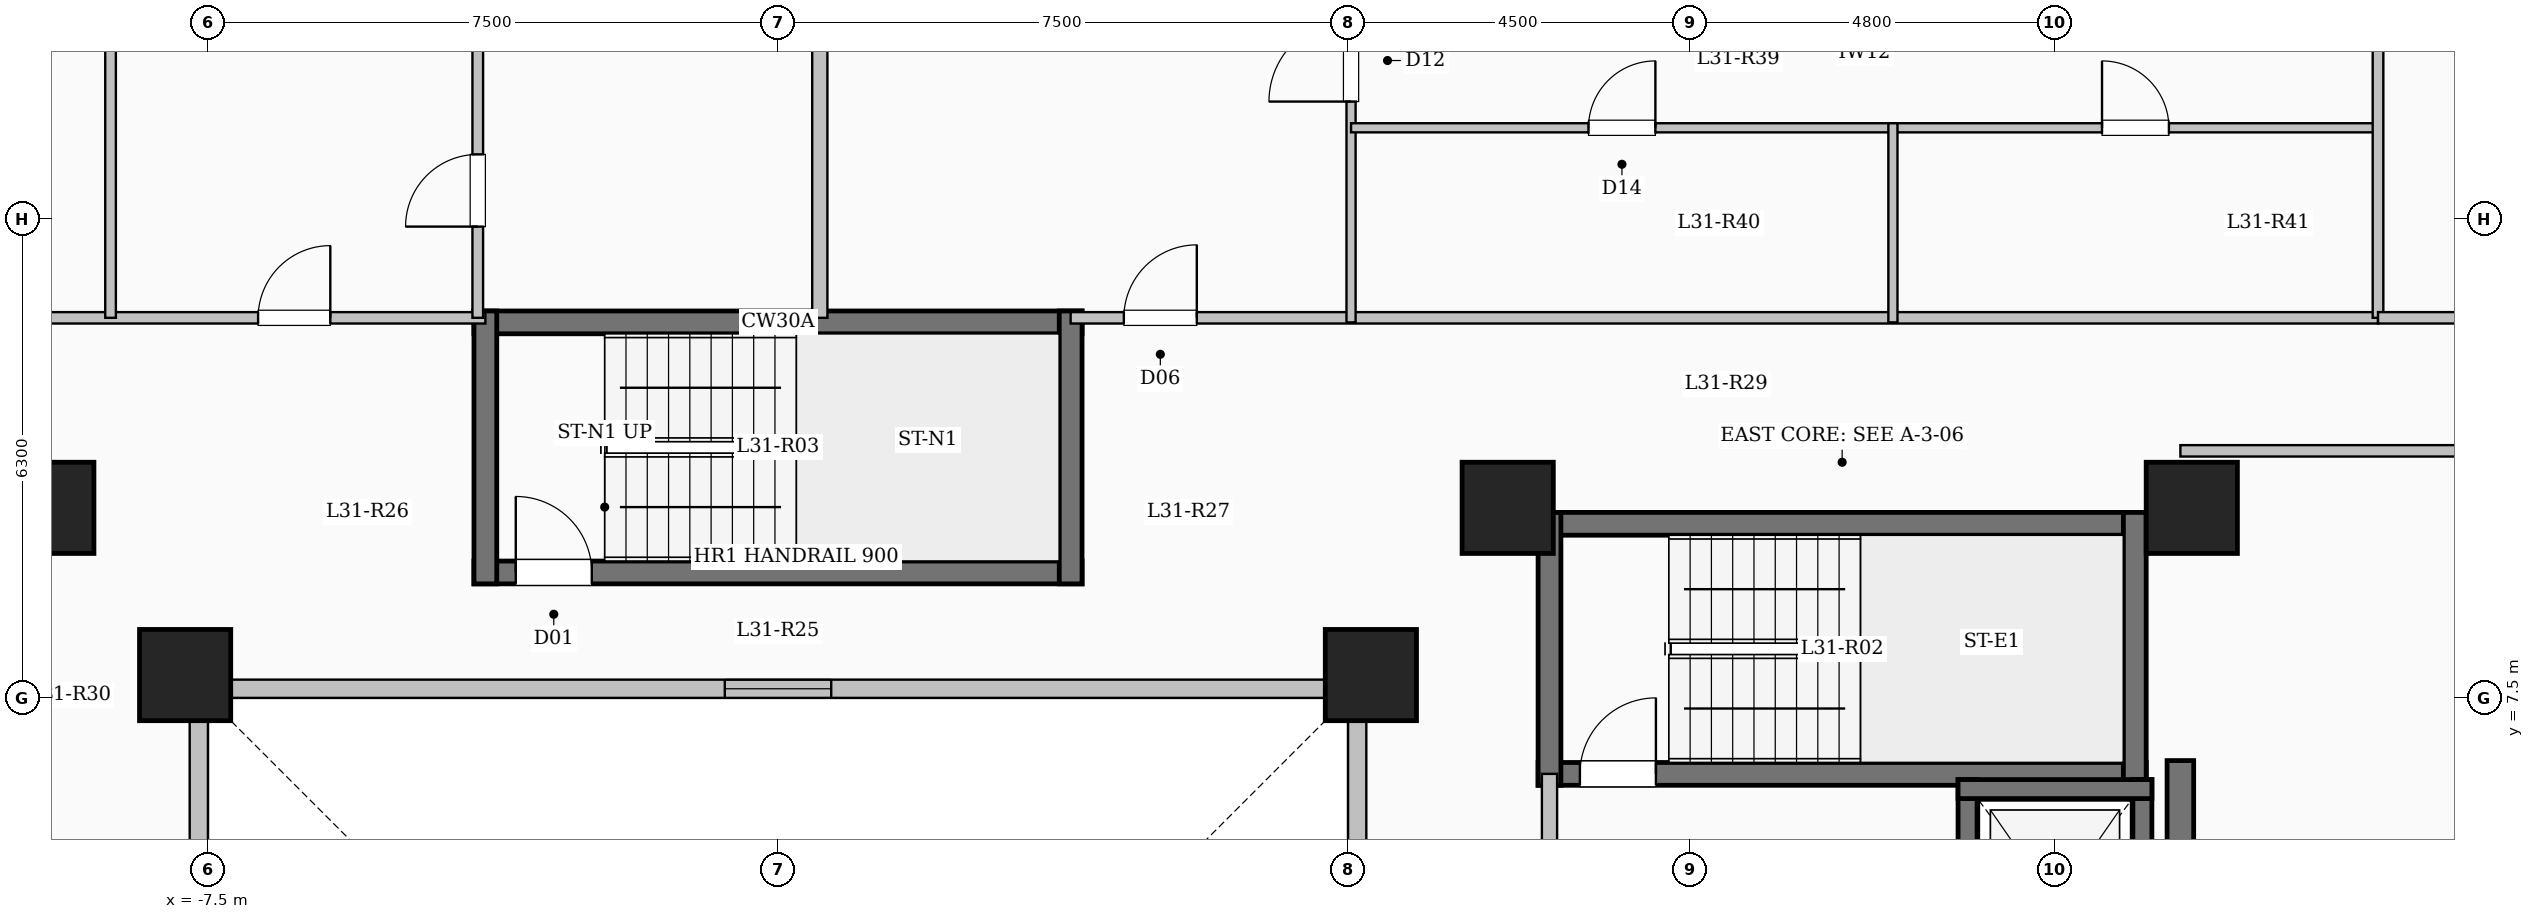
"""IFC4 building model, lengths in metres.
Left out: names, types, materials, properties, quantities, classifications, styles, units other than length and angle.
Written with IfcOpenShell. Run it as: python <this file> out.ifc"""

import sys

from ifc_helpers import new_model, si_unit, direction, frame, frame_2d, origin, origin_2d, place, context, subcontext, project, spatial, rectangle, extrude, element, fill, save


model = new_model("IFC4")
c1 = context("Model", 3, precision=1e-05, world=origin(), true_north=direction((0.0, 1.0)))
c2 = subcontext(c1, "Body", "Model", "MODEL_VIEW")
j1 = project(units=[si_unit("LENGTHUNIT", "METRE"), si_unit("PLANEANGLEUNIT", "RADIAN")], contexts=[c1])
p1 = place(None, origin())
s1 = spatial("IfcSite", under=j1, at=p1, CompositionType="ELEMENT")
p2 = place(p1, origin())
s2 = spatial("IfcBuilding", under=s1, at=p2, CompositionType="ELEMENT")
p3 = place(p2, frame((0.0, 0.0, 115.15)))
s3 = spatial("IfcBuildingStorey", under=s2, at=p3, CompositionType="ELEMENT", Elevation=115.15)
for number, where, z_axis, x_axis in (
    (1, (-7.8, 7.8, 0.0), (0.0, 0.0, 1.0), (1.0, 0.0, 0.0)),
    (2, (7.8, 7.8, 0.0), (0.0, 0.0, 1.0), (1.0, 0.0, 0.0)),
    (3, (-9.6, 10.0, 0.0), (0.0, 0.0, 1.0), (1.0, 0.0, 0.0)),
    (4, (9.6, 10.0, 0.0), (0.0, 0.0, 1.0), (1.0, 0.0, 0.0)),
    (5, (18.6, 10.0, 0.0), (0.0, 0.0, 1.0), (1.0, 0.0, 0.0)),
):
    element("IfcColumn", number, at=place(p3, frame(where, z_axis=z_axis, x_axis=x_axis)), inside=s3, PredefinedType="COLUMN", context=c2, shape_type="SweptSolid", body=[
        extrude(rectangle(XDim=1.2, YDim=1.2, at=origin_2d()), origin(), (0.0, 0.0, 1.0), 3.35),
    ])
p4 = place(p3, frame((7.62, -7.62, 0.0), z_axis=(0.0, 0.0, 1.0), x_axis=(0.0, 1.0, 0.0)))
e6 = element("IfcWall", 6, at=p4, inside=s3, PredefinedType="SOLIDWALL", context=c2, shape_type="SweptSolid", body=[
    extrude(rectangle(XDim=15.24, YDim=0.24, at=frame_2d((7.62, 0.0))), origin(), (0.0, 0.0, 1.0), 3.05),
])
p5 = place(p4, frame((6.92, 0.0, 0.95)))
e7 = element("IfcOpeningElement", 7, at=p5, cuts=e6, PredefinedType="OPENING", context=c2, shape_type="SweptSolid", body=[
    extrude(rectangle(XDim=1.4, YDim=1.5, at=frame_2d((0.7, 0.75))), frame((0.0, 0.13, 0.0), z_axis=(0.0, -1.0, 0.0), x_axis=(1.0, 0.0, 0.0)), (0.0, 0.0, 1.0), 0.26),
])
p6 = place(p3, frame((7.62, 7.62, 0.0), z_axis=(0.0, 0.0, 1.0), x_axis=(-1.0, 0.0, 0.0)))
e8 = element("IfcWall", 8, at=p6, inside=s3, PredefinedType="SOLIDWALL", context=c2, shape_type="SweptSolid", body=[
    extrude(rectangle(XDim=15.24, YDim=0.24, at=frame_2d((7.62, 0.0))), origin(), (0.0, 0.0, 1.0), 3.05),
])
p7 = place(p6, frame((6.92, 0.0, 0.95)))
e9 = element("IfcOpeningElement", 9, at=p7, cuts=e8, PredefinedType="OPENING", context=c2, shape_type="SweptSolid", body=[
    extrude(rectangle(XDim=1.4, YDim=1.5, at=frame_2d((0.7, 0.75))), frame((0.0, 0.13, 0.0), z_axis=(0.0, -1.0, 0.0), x_axis=(1.0, 0.0, 0.0)), (0.0, 0.0, 1.0), 0.26),
])
p8 = place(p3, frame((-7.62, 7.62, 0.0), z_axis=(0.0, 0.0, 1.0), x_axis=(0.0, -1.0, 0.0)))
e10 = element("IfcWall", 10, at=p8, inside=s3, PredefinedType="SOLIDWALL", context=c2, shape_type="SweptSolid", body=[
    extrude(rectangle(XDim=15.24, YDim=0.24, at=frame_2d((7.62, 0.0))), origin(), (0.0, 0.0, 1.0), 3.05),
])
p9 = place(p8, frame((6.92, 0.0, 0.95)))
e11 = element("IfcOpeningElement", 11, at=p9, cuts=e10, PredefinedType="OPENING", context=c2, shape_type="SweptSolid", body=[
    extrude(rectangle(XDim=1.4, YDim=1.5, at=frame_2d((0.7, 0.75))), frame((0.0, 0.13, 0.0), z_axis=(0.0, -1.0, 0.0), x_axis=(1.0, 0.0, 0.0)), (0.0, 0.0, 1.0), 0.26),
])
p10 = place(p3, frame((10.0, 9.79, 0.0), z_axis=(0.0, 0.0, 1.0), x_axis=(1.0, 0.0, 0.0)))
e12 = element("IfcWall", 12, at=p10, inside=s3, PredefinedType="SHEAR", context=c2, shape_type="SweptSolid", body=[
    extrude(rectangle(XDim=8.0, YDim=0.3, at=frame_2d((4.0, 0.0))), origin(), (0.0, 0.0, 1.0), 3.35),
])
p11 = place(p3, frame((10.0, 6.5, 0.0), z_axis=(0.0, 0.0, 1.0), x_axis=(1.0, 0.0, 0.0)))
e13 = element("IfcWall", 13, at=p11, inside=s3, PredefinedType="SHEAR", context=c2, shape_type="SweptSolid", body=[
    extrude(rectangle(XDim=8.0, YDim=0.3, at=frame_2d((4.0, 0.0))), origin(), (0.0, 0.0, 1.0), 3.35),
])
p12 = place(p11, frame((0.55, 0.0, 0.0)))
e14 = element("IfcOpeningElement", 14, at=p12, cuts=e13, PredefinedType="OPENING", context=c2, shape_type="SweptSolid", body=[
    extrude(rectangle(XDim=1.0, YDim=2.15, at=frame_2d((0.5, 1.075))), frame((0.0, 0.16, 0.0), z_axis=(0.0, -1.0, 0.0), x_axis=(1.0, 0.0, 0.0)), (0.0, 0.0, 1.0), 0.32),
])
for number, where, z_axis, x_axis in (
    (15, (10.15, 6.35, 0.0), (0.0, 0.0, 1.0), (0.0, 1.0, 0.0)),
    (16, (17.85, 6.35, 0.0), (0.0, 0.0, 1.0), (0.0, 1.0, 0.0)),
):
    element("IfcWall", number, at=place(p3, frame(where, z_axis=z_axis, x_axis=x_axis)), inside=s3, PredefinedType="SHEAR", context=c2, shape_type="SweptSolid", body=[
        extrude(rectangle(XDim=3.59, YDim=0.3, at=frame_2d((1.795, 0.0))), origin(), (0.0, 0.0, 1.0), 3.35),
    ])
p13 = place(p3, frame((-4.0, 12.44, 0.0), z_axis=(0.0, 0.0, 1.0), x_axis=(1.0, 0.0, 0.0)))
e17 = element("IfcWall", 17, at=p13, inside=s3, PredefinedType="SHEAR", context=c2, shape_type="SweptSolid", body=[
    extrude(rectangle(XDim=8.0, YDim=0.3, at=frame_2d((4.0, 0.0))), origin(), (0.0, 0.0, 1.0), 3.35),
])
p14 = place(p3, frame((-4.0, 9.15, 0.0), z_axis=(0.0, 0.0, 1.0), x_axis=(1.0, 0.0, 0.0)))
e18 = element("IfcWall", 18, at=p14, inside=s3, PredefinedType="SHEAR", context=c2, shape_type="SweptSolid", body=[
    extrude(rectangle(XDim=8.0, YDim=0.3, at=frame_2d((4.0, 0.0))), origin(), (0.0, 0.0, 1.0), 3.35),
])
p15 = place(p14, frame((0.55, 0.0, 0.0)))
e19 = element("IfcOpeningElement", 19, at=p15, cuts=e18, PredefinedType="OPENING", context=c2, shape_type="SweptSolid", body=[
    extrude(rectangle(XDim=1.0, YDim=2.15, at=frame_2d((0.5, 1.075))), frame((0.0, 0.16, 0.0), z_axis=(0.0, -1.0, 0.0), x_axis=(1.0, 0.0, 0.0)), (0.0, 0.0, 1.0), 0.32),
])
for number, where, z_axis, x_axis in (
    (20, (-3.85, 9.0, 0.0), (0.0, 0.0, 1.0), (0.0, 1.0, 0.0)),
    (21, (3.85, 9.0, 0.0), (0.0, 0.0, 1.0), (0.0, 1.0, 0.0)),
):
    element("IfcWall", number, at=place(p3, frame(where, z_axis=z_axis, x_axis=x_axis)), inside=s3, PredefinedType="SHEAR", context=c2, shape_type="SweptSolid", body=[
        extrude(rectangle(XDim=3.59, YDim=0.3, at=frame_2d((1.795, 0.0))), origin(), (0.0, 0.0, 1.0), 3.35),
    ])
p16 = place(p3, frame((10.15, 3.25, 0.0), z_axis=(0.0, 0.0, 1.0), x_axis=(0.0, 1.0, 0.0)))
e22 = element("IfcWall", 22, at=p16, inside=s3, PredefinedType="SOLIDWALL", context=c2, shape_type="SweptSolid", body=[
    extrude(rectangle(XDim=3.25, YDim=0.2, at=frame_2d((1.625, 0.0))), origin(), (0.0, 0.0, 1.0), 3.05),
])
p17 = place(p16, frame((1.1, 0.0, 0.0)))
e23 = element("IfcOpeningElement", 23, at=p17, cuts=e22, PredefinedType="OPENING", context=c2, shape_type="SweptSolid", body=[
    extrude(rectangle(XDim=1.02, YDim=2.15, at=frame_2d((0.51, 1.075))), frame((0.0, 0.11, 0.0), z_axis=(0.0, -1.0, 0.0), x_axis=(1.0, 0.0, 0.0)), (0.0, 0.0, 1.0), 0.22),
])
p18 = place(p3, frame((15.65, 3.175, 0.0), z_axis=(0.0, 0.0, 1.0), x_axis=(0.0, 1.0, 0.0)))
e24 = element("IfcWall", 24, at=p18, inside=s3, PredefinedType="SHEAR", context=c2, shape_type="SweptSolid", body=[
    extrude(rectangle(XDim=3.25, YDim=0.25, at=frame_2d((1.625, 0.0))), origin(), (0.0, 0.0, 1.0), 3.35),
])
p19 = place(p18, frame((1.075, 0.0, 0.0)))
e25 = element("IfcOpeningElement", 25, at=p19, cuts=e24, PredefinedType="OPENING", context=c2, shape_type="SweptSolid", body=[
    extrude(rectangle(XDim=1.1, YDim=2.15, at=frame_2d((0.55, 1.075))), frame((0.0, 0.135, 0.0), z_axis=(0.0, -1.0, 0.0), x_axis=(1.0, 0.0, 0.0)), (0.0, 0.0, 1.0), 0.27),
])
p20 = place(p3, frame((17.95, 3.175, 0.0), z_axis=(0.0, 0.0, 1.0), x_axis=(0.0, 1.0, 0.0)))
e26 = element("IfcWall", 26, at=p20, inside=s3, PredefinedType="SHEAR", context=c2, shape_type="SweptSolid", body=[
    extrude(rectangle(XDim=3.25, YDim=0.25, at=frame_2d((1.625, 0.0))), origin(), (0.0, 0.0, 1.0), 3.35),
])
p21 = place(p3, frame((15.525, 6.3, 0.0), z_axis=(0.0, 0.0, 1.0), x_axis=(1.0, 0.0, 0.0)))
e27 = element("IfcWall", 27, at=p21, inside=s3, PredefinedType="SHEAR", context=c2, shape_type="SweptSolid", body=[
    extrude(rectangle(XDim=2.55, YDim=0.25, at=frame_2d((1.275, 0.0))), origin(), (0.0, 0.0, 1.0), 3.35),
])
p22 = place(p3, frame((18.45, -7.375, 0.0), z_axis=(0.0, 0.0, 1.0), x_axis=(0.0, 1.0, 0.0)))
e28 = element("IfcWall", 28, at=p22, inside=s3, PredefinedType="SHEAR", context=c2, shape_type="SweptSolid", body=[
    extrude(rectangle(XDim=14.05, YDim=0.35, at=frame_2d((7.025, 0.0))), origin(), (0.0, 0.0, 1.0), 3.35),
])
p23 = place(p3, frame((-21.05, 12.5, 0.0), z_axis=(0.0, 0.0, 1.0), x_axis=(1.0, 0.0, 0.0)))
e29 = element("IfcWall", 29, at=p23, inside=s3, PredefinedType="PARTITIONING", context=c2, shape_type="SweptSolid", body=[
    extrude(rectangle(XDim=17.2, YDim=0.15, at=frame_2d((8.6, 0.0))), origin(), (0.0, 0.0, 1.0), 3.05),
])
p24 = place(p23, frame((2.562, 0.0, 0.0)))
e30 = element("IfcOpeningElement", 30, at=p24, cuts=e29, PredefinedType="OPENING", context=c2, shape_type="SweptSolid", body=[
    extrude(rectangle(XDim=0.95, YDim=2.15, at=frame_2d((0.475, 1.075))), frame((0.0, 0.085, 0.0), z_axis=(0.0, -1.0, 0.0), x_axis=(1.0, 0.0, 0.0)), (0.0, 0.0, 1.0), 0.17),
])
p25 = place(p23, frame((8.726, 0.0, 0.0)))
e31 = element("IfcOpeningElement", 31, at=p25, cuts=e29, PredefinedType="OPENING", context=c2, shape_type="SweptSolid", body=[
    extrude(rectangle(XDim=0.95, YDim=2.15, at=frame_2d((0.475, 1.075))), frame((0.0, 0.085, 0.0), z_axis=(0.0, -1.0, 0.0), x_axis=(1.0, 0.0, 0.0)), (0.0, 0.0, 1.0), 0.17),
])
p26 = place(p23, frame((14.21, 0.0, 0.0)))
e32 = element("IfcOpeningElement", 32, at=p26, cuts=e29, PredefinedType="OPENING", context=c2, shape_type="SweptSolid", body=[
    extrude(rectangle(XDim=0.95, YDim=2.15, at=frame_2d((0.475, 1.075))), frame((0.0, 0.085, 0.0), z_axis=(0.0, -1.0, 0.0), x_axis=(1.0, 0.0, 0.0)), (0.0, 0.0, 1.0), 0.17),
])
p27 = place(p3, frame((3.85, 12.5, 0.0), z_axis=(0.0, 0.0, 1.0), x_axis=(1.0, 0.0, 0.0)))
e33 = element("IfcWall", 33, at=p27, inside=s3, PredefinedType="PARTITIONING", context=c2, shape_type="SweptSolid", body=[
    extrude(rectangle(XDim=17.2, YDim=0.15, at=frame_2d((8.6, 0.0))), origin(), (0.0, 0.0, 1.0), 3.05),
])
p28 = place(p27, frame((0.7, 0.0, 0.0)))
e34 = element("IfcOpeningElement", 34, at=p28, cuts=e33, PredefinedType="OPENING", context=c2, shape_type="SweptSolid", body=[
    extrude(rectangle(XDim=0.96, YDim=2.15, at=frame_2d((0.48, 1.075))), frame((0.0, 0.085, 0.0), z_axis=(0.0, -1.0, 0.0), x_axis=(1.0, 0.0, 0.0)), (0.0, 0.0, 1.0), 0.17),
])
p29 = place(p3, frame((0.55, 12.5, 0.0), z_axis=(0.0, 0.0, 1.0), x_axis=(0.0, 1.0, 0.0)))
e35 = element("IfcWall", 35, at=p29, inside=s3, PredefinedType="SOLIDWALL", context=c2, shape_type="SweptSolid", body=[
    extrude(rectangle(XDim=11.08, YDim=0.2, at=frame_2d((5.54, 0.0))), origin(), (0.0, 0.0, 1.0), 3.05),
])
p30 = place(p3, frame((-3.95, 12.5, 0.0), z_axis=(0.0, 0.0, 1.0), x_axis=(0.0, 1.0, 0.0)))
e36 = element("IfcWall", 36, at=p30, inside=s3, PredefinedType="PARTITIONING", context=c2, shape_type="SweptSolid", body=[
    extrude(rectangle(XDim=9.55, YDim=0.14, at=frame_2d((4.775, 0.0))), origin(), (0.0, 0.0, 1.0), 3.05),
])
p31 = place(p30, frame((1.2, 0.0, 0.0)))
e37 = element("IfcOpeningElement", 37, at=p31, cuts=e36, PredefinedType="OPENING", context=c2, shape_type="SweptSolid", body=[
    extrude(rectangle(XDim=0.95, YDim=2.15, at=frame_2d((0.475, 1.075))), frame((0.0, 0.08, 0.0), z_axis=(0.0, -1.0, 0.0), x_axis=(1.0, 0.0, 0.0)), (0.0, 0.0, 1.0), 0.16),
])
p32 = place(p3, frame((-8.781, 12.5, 0.0), z_axis=(0.0, 0.0, 1.0), x_axis=(0.0, 1.0, 0.0)))
e38 = element("IfcWall", 38, at=p32, inside=s3, PredefinedType="PARTITIONING", context=c2, shape_type="SweptSolid", body=[
    extrude(rectangle(XDim=9.55, YDim=0.14, at=frame_2d((4.775, 0.0))), origin(), (0.0, 0.0, 1.0), 3.05),
])
p33 = place(p3, frame((7.539, 12.44, 0.0), z_axis=(0.0, 0.0, 1.0), x_axis=(0.0, 1.0, 0.0)))
e39 = element("IfcWall", 39, at=p33, inside=s3, PredefinedType="PARTITIONING", context=c2, shape_type="SweptSolid", body=[
    extrude(rectangle(XDim=10.514, YDim=0.12, at=frame_2d((5.257, 0.0))), origin(), (0.0, 0.0, 1.0), 2.385),
])
p34 = place(p33, frame((2.905, 0.0, 0.0)))
e40 = element("IfcOpeningElement", 40, at=p34, cuts=e39, PredefinedType="OPENING", context=c2, shape_type="SweptSolid", body=[
    extrude(rectangle(XDim=1.08, YDim=2.15, at=frame_2d((0.54, 1.075))), frame((0.0, 0.07, 0.0), z_axis=(0.0, -1.0, 0.0), x_axis=(1.0, 0.0, 0.0)), (0.0, 0.0, 1.0), 0.14),
])
p35 = place(p3, frame((7.539, 15.0, 0.0), z_axis=(0.0, 0.0, 1.0), x_axis=(1.0, 0.0, 0.0)))
e41 = element("IfcWall", 41, at=p35, inside=s3, PredefinedType="PARTITIONING", context=c2, shape_type="SweptSolid", body=[
    extrude(rectangle(XDim=7.129, YDim=0.12, at=frame_2d((3.564, 0.0))), origin(), (0.0, 0.0, 1.0), 3.05),
])
p36 = place(p35, frame((3.124, 0.0, 0.0)))
e42 = element("IfcOpeningElement", 42, at=p36, cuts=e41, PredefinedType="OPENING", context=c2, shape_type="SweptSolid", body=[
    extrude(rectangle(XDim=0.88, YDim=2.1, at=frame_2d((0.44, 1.05))), frame((0.0, 0.07, 0.0), z_axis=(0.0, -1.0, 0.0), x_axis=(1.0, 0.0, 0.0)), (0.0, 0.0, 1.0), 0.14),
])
p37 = place(p3, frame((14.668, 15.0, 0.0), z_axis=(0.0, 0.0, 1.0), x_axis=(1.0, 0.0, 0.0)))
e43 = element("IfcWall", 43, at=p37, inside=s3, PredefinedType="PARTITIONING", context=c2, shape_type="SweptSolid", body=[
    extrude(rectangle(XDim=6.382, YDim=0.12, at=frame_2d((3.191, 0.0))), origin(), (0.0, 0.0, 1.0), 3.05),
])
p38 = place(p37, frame((2.751, 0.0, 0.0)))
e44 = element("IfcOpeningElement", 44, at=p38, cuts=e43, PredefinedType="OPENING", context=c2, shape_type="SweptSolid", body=[
    extrude(rectangle(XDim=0.88, YDim=2.1, at=frame_2d((0.44, 1.05))), frame((0.0, 0.07, 0.0), z_axis=(0.0, -1.0, 0.0), x_axis=(1.0, 0.0, 0.0)), (0.0, 0.0, 1.0), 0.14),
])
p39 = place(p3, frame((14.668, 12.44, 0.0), z_axis=(0.0, 0.0, 1.0), x_axis=(0.0, 1.0, 0.0)))
e45 = element("IfcWall", 45, at=p39, inside=s3, PredefinedType="PARTITIONING", context=c2, shape_type="SweptSolid", body=[
    extrude(rectangle(XDim=2.62, YDim=0.12, at=frame_2d((1.31, 0.0))), origin(), (0.0, 0.0, 1.0), 3.05),
])
p40 = place(p3, frame((18.45, 10.75, 0.0), z_axis=(0.0, 0.0, 1.0), x_axis=(1.0, 0.0, 0.0)))
e46 = element("IfcWall", 46, at=p40, inside=s3, PredefinedType="PARTITIONING", context=c2, shape_type="SweptSolid", body=[
    extrude(rectangle(XDim=8.43, YDim=0.15, at=frame_2d((4.215, 0.0))), origin(), (0.0, 0.0, 1.0), 3.05),
])
p41 = place(p3, frame((21.05, 12.5, 0.0), z_axis=(0.0, 0.0, 1.0), x_axis=(0.0, 1.0, 0.0)))
e47 = element("IfcWall", 47, at=p41, inside=s3, PredefinedType="PARTITIONING", context=c2, shape_type="SweptSolid", body=[
    extrude(rectangle(XDim=5.35, YDim=0.14, at=frame_2d((2.675, 0.0))), origin(), (0.0, 0.0, 1.0), 3.05),
])
p42 = place(p3, frame((21.05, 12.5, 0.0), z_axis=(0.0, 0.0, 1.0), x_axis=(1.0, 0.0, 0.0)))
e48 = element("IfcWall", 48, at=p42, inside=s3, PredefinedType="PARTITIONING", context=c2, shape_type="SweptSolid", body=[
    extrude(rectangle(XDim=5.83, YDim=0.15, at=frame_2d((2.915, 0.0))), origin(), (0.0, 0.0, 1.0), 3.05),
])
p43 = place(p42, frame((2.44, 0.0, 0.0)))
e49 = element("IfcOpeningElement", 49, at=p43, cuts=e48, PredefinedType="OPENING", context=c2, shape_type="SweptSolid", body=[
    extrude(rectangle(XDim=0.95, YDim=2.15, at=frame_2d((0.475, 1.075))), frame((0.0, 0.085, 0.0), z_axis=(0.0, -1.0, 0.0), x_axis=(1.0, 0.0, 0.0)), (0.0, 0.0, 1.0), 0.17),
])
p44 = place(p7, origin())
e50 = element("IfcWindow", 50, at=p44, inside=s3, PartitioningType="SINGLE_PANEL", PredefinedType="WINDOW", context=c2, shape_type="SweptSolid", body=[
    extrude(rectangle(XDim=1.4, YDim=1.5, at=frame_2d((0.7, 0.75))), frame((0.0, 0.03, 0.0), z_axis=(0.0, -1.0, 0.0), x_axis=(1.0, 0.0, 0.0)), (0.0, 0.0, 1.0), 0.06),
])
fill(e9, e50)
p45 = place(p12, origin())
e51 = element("IfcDoor", 51, at=p45, inside=s3, OperationType="SINGLE_SWING_RIGHT", PredefinedType="DOOR", context=c2, shape_type="SweptSolid", body=[
    extrude(rectangle(XDim=1.0, YDim=2.15, at=frame_2d((0.5, 1.075))), frame((0.0, 0.025, 0.0), z_axis=(0.0, -1.0, 0.0), x_axis=(1.0, 0.0, 0.0)), (0.0, 0.0, 1.0), 0.05),
])
fill(e14, e51)
p46 = place(p15, origin())
e52 = element("IfcDoor", 52, at=p46, inside=s3, OperationType="SINGLE_SWING_LEFT", PredefinedType="DOOR", context=c2, shape_type="SweptSolid", body=[
    extrude(rectangle(XDim=1.0, YDim=2.15, at=frame_2d((0.5, 1.075))), frame((0.0, 0.025, 0.0), z_axis=(0.0, -1.0, 0.0), x_axis=(1.0, 0.0, 0.0)), (0.0, 0.0, 1.0), 0.05),
])
fill(e19, e52)
p47 = place(p26, origin())
e53 = element("IfcDoor", 53, at=p47, inside=s3, OperationType="SINGLE_SWING_RIGHT", PredefinedType="DOOR", context=c2, shape_type="SweptSolid", body=[
    extrude(rectangle(XDim=0.95, YDim=2.15, at=frame_2d((0.475, 1.075))), frame((0.0, 0.025, 0.0), z_axis=(0.0, -1.0, 0.0), x_axis=(1.0, 0.0, 0.0)), (0.0, 0.0, 1.0), 0.05),
])
fill(e32, e53)
p48 = place(p31, origin())
e54 = element("IfcDoor", 54, at=p48, inside=s3, OperationType="SINGLE_SWING_LEFT", PredefinedType="DOOR", context=c2, shape_type="SweptSolid", body=[
    extrude(rectangle(XDim=0.95, YDim=2.15, at=frame_2d((0.475, 1.075))), frame((0.0, 0.025, 0.0), z_axis=(0.0, -1.0, 0.0), x_axis=(1.0, 0.0, 0.0)), (0.0, 0.0, 1.0), 0.05),
])
fill(e37, e54)
p49 = place(p28, origin())
e55 = element("IfcDoor", 55, at=p49, inside=s3, OperationType="SINGLE_SWING_RIGHT", PredefinedType="DOOR", context=c2, shape_type="SweptSolid", body=[
    extrude(rectangle(XDim=0.96, YDim=2.15, at=frame_2d((0.48, 1.075))), frame((0.0, 0.025, 0.0), z_axis=(0.0, -1.0, 0.0), x_axis=(1.0, 0.0, 0.0)), (0.0, 0.0, 1.0), 0.05),
])
fill(e34, e55)
p50 = place(p34, origin())
e56 = element("IfcDoor", 56, at=p50, inside=s3, OperationType="SINGLE_SWING_LEFT", PredefinedType="DOOR", context=c2, shape_type="SweptSolid", body=[
    extrude(rectangle(XDim=1.08, YDim=2.15, at=frame_2d((0.54, 1.075))), frame((0.0, 0.025, 0.0), z_axis=(0.0, -1.0, 0.0), x_axis=(1.0, 0.0, 0.0)), (0.0, 0.0, 1.0), 0.05),
])
fill(e40, e56)
p51 = place(p36, origin())
e57 = element("IfcDoor", 57, at=p51, inside=s3, OperationType="SINGLE_SWING_RIGHT", PredefinedType="DOOR", context=c2, shape_type="SweptSolid", body=[
    extrude(rectangle(XDim=0.88, YDim=2.1, at=frame_2d((0.44, 1.05))), frame((0.0, 0.025, 0.0), z_axis=(0.0, -1.0, 0.0), x_axis=(1.0, 0.0, 0.0)), (0.0, 0.0, 1.0), 0.05),
])
fill(e42, e57)
p52 = place(p38, origin())
e58 = element("IfcDoor", 58, at=p52, inside=s3, OperationType="SINGLE_SWING_LEFT", PredefinedType="DOOR", context=c2, shape_type="SweptSolid", body=[
    extrude(rectangle(XDim=0.88, YDim=2.1, at=frame_2d((0.44, 1.05))), frame((0.0, 0.025, 0.0), z_axis=(0.0, -1.0, 0.0), x_axis=(1.0, 0.0, 0.0)), (0.0, 0.0, 1.0), 0.05),
])
fill(e44, e58)
save(model, sys.argv[1])
